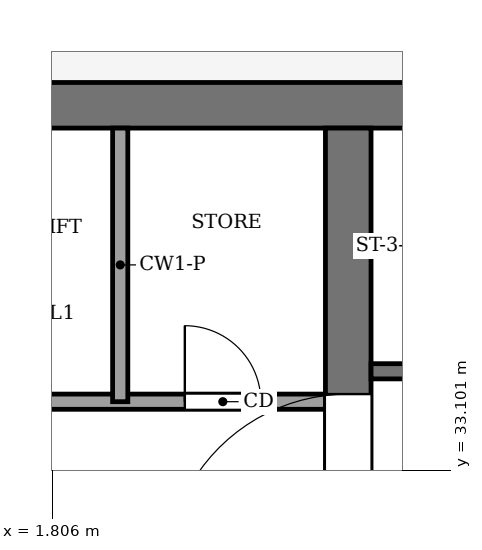
"""IFC4 building model, lengths in metres.
Left out: names, types, materials, properties, quantities, classifications, styles, units other than length and angle.
Written with IfcOpenShell. Run it as: python <this file> out.ifc"""

import sys

from ifc_helpers import new_model, si_unit, direction, frame, frame_2d, origin, place, context, subcontext, project, spatial, rectangle, extrude, element, fill, save


model = new_model("IFC4")
c1 = context("Model", 3, precision=1e-05, world=origin(), true_north=direction((0.0, 1.0)))
c2 = subcontext(c1, "Body", "Model", "MODEL_VIEW")
j1 = project(units=[si_unit("LENGTHUNIT", "METRE"), si_unit("PLANEANGLEUNIT", "RADIAN")], contexts=[c1])
p1 = place(None, origin())
s1 = spatial("IfcSite", under=j1, at=p1, CompositionType="ELEMENT")
p2 = place(p1, origin())
s2 = spatial("IfcBuilding", under=s1, at=p2, CompositionType="ELEMENT")
p3 = place(p2, frame((0.0, 0.0, 340.5)))
s3 = spatial("IfcBuildingStorey", under=s2, at=p3, CompositionType="ELEMENT", Elevation=340.5)
p4 = place(p3, frame((-13.2, 37.9, -0.15), z_axis=(0.0, 0.0, 1.0), x_axis=(1.0, 0.0, 0.0)))
e1 = element("IfcWall", 1, at=p4, inside=s3, PredefinedType="SHEAR", context=c2, shape_type="SweptSolid", body=[
    extrude(rectangle(XDim=26.4, YDim=0.6, at=frame_2d((13.2, 0.0))), origin(), (0.0, 0.0, 1.0), 9.0),
])
p5 = place(p3, frame((5.7, 18.4, -0.15), z_axis=(0.0, 0.0, 1.0), x_axis=(0.0, 1.0, 0.0)))
e2 = element("IfcWall", 2, at=p5, inside=s3, PredefinedType="SHEAR", context=c2, shape_type="SweptSolid", body=[
    extrude(rectangle(XDim=19.2, YDim=0.6, at=frame_2d((9.6, 0.0))), origin(), (0.0, 0.0, 1.0), 9.0),
])
p6 = place(p5, frame((13.3, 0.0, 0.15)))
e3 = element("IfcOpeningElement", 3, at=p6, cuts=e2, PredefinedType="OPENING", context=c2, shape_type="SweptSolid", body=[
    extrude(rectangle(XDim=2.4, YDim=2.4, at=frame_2d((1.2, 1.2))), frame((0.0, 0.31, 0.0), z_axis=(0.0, -1.0, 0.0), x_axis=(1.0, 0.0, 0.0)), (0.0, 0.0, 1.0), 0.62),
])
p7 = place(p3, frame((-5.4, 34.0, 0.0), z_axis=(0.0, 0.0, 1.0), x_axis=(1.0, 0.0, 0.0)))
e4 = element("IfcWall", 4, at=p7, inside=s3, PredefinedType="PARTITIONING", context=c2, shape_type="SweptSolid", body=[
    extrude(rectangle(XDim=10.8, YDim=0.2, at=frame_2d((5.4, 0.0))), origin(), (0.0, 0.0, 1.0), 8.85),
])
p8 = place(p7, frame((8.95, 0.0, 0.0)))
e5 = element("IfcOpeningElement", 5, at=p8, cuts=e4, PredefinedType="OPENING", context=c2, shape_type="SweptSolid", body=[
    extrude(rectangle(XDim=1.0, YDim=2.1, at=frame_2d((0.5, 1.05))), frame((0.0, 0.11, 0.0), z_axis=(0.0, -1.0, 0.0), x_axis=(1.0, 0.0, 0.0)), (0.0, 0.0, 1.0), 0.22),
])
p9 = place(p3, frame((6.0, 34.4, 0.0), z_axis=(0.0, 0.0, 1.0), x_axis=(1.0, 0.0, 0.0)))
e6 = element("IfcWall", 6, at=p9, inside=s3, PredefinedType="PARTITIONING", context=c2, shape_type="SweptSolid", body=[
    extrude(rectangle(XDim=6.6, YDim=0.2, at=frame_2d((3.3, 0.0))), origin(), (0.0, 0.0, 1.0), 8.85),
])
p10 = place(p9, frame((4.8, 0.0, 0.0)))
e7 = element("IfcOpeningElement", 7, at=p10, cuts=e6, PredefinedType="OPENING", context=c2, shape_type="SweptSolid", body=[
    extrude(rectangle(XDim=1.2, YDim=2.2, at=frame_2d((0.6, 1.1))), frame((0.0, 0.11, 0.0), z_axis=(0.0, -1.0, 0.0), x_axis=(1.0, 0.0, 0.0)), (0.0, 0.0, 1.0), 0.22),
])
p11 = place(p3, frame((2.7, 34.0, 0.0), z_axis=(0.0, 0.0, 1.0), x_axis=(0.0, 1.0, 0.0)))
e8 = element("IfcWall", 8, at=p11, inside=s3, PredefinedType="PARTITIONING", context=c2, shape_type="SweptSolid", body=[
    extrude(rectangle(XDim=3.6, YDim=0.2, at=frame_2d((1.8, 0.0))), origin(), (0.0, 0.0, 1.0), 8.85),
])
p12 = place(p8, origin())
e9 = element("IfcDoor", 9, at=p12, inside=s3, OperationType="SINGLE_SWING_LEFT", PredefinedType="DOOR", context=c2, shape_type="SweptSolid", body=[
    extrude(rectangle(XDim=1.0, YDim=2.1, at=frame_2d((0.5, 1.05))), frame((0.0, 0.025, 0.0), z_axis=(0.0, -1.0, 0.0), x_axis=(1.0, 0.0, 0.0)), (0.0, 0.0, 1.0), 0.05),
])
fill(e5, e9)
p13 = place(p6, origin())
e10 = element("IfcDoor", 10, at=p13, inside=s3, OperationType="DOUBLE_DOOR_SINGLE_SWING", PredefinedType="DOOR", context=c2, shape_type="SweptSolid", body=[
    extrude(rectangle(XDim=2.4, YDim=2.4, at=frame_2d((1.2, 1.2))), frame((0.0, 0.025, 0.0), z_axis=(0.0, -1.0, 0.0), x_axis=(1.0, 0.0, 0.0)), (0.0, 0.0, 1.0), 0.05),
])
fill(e3, e10)
save(model, sys.argv[1])
